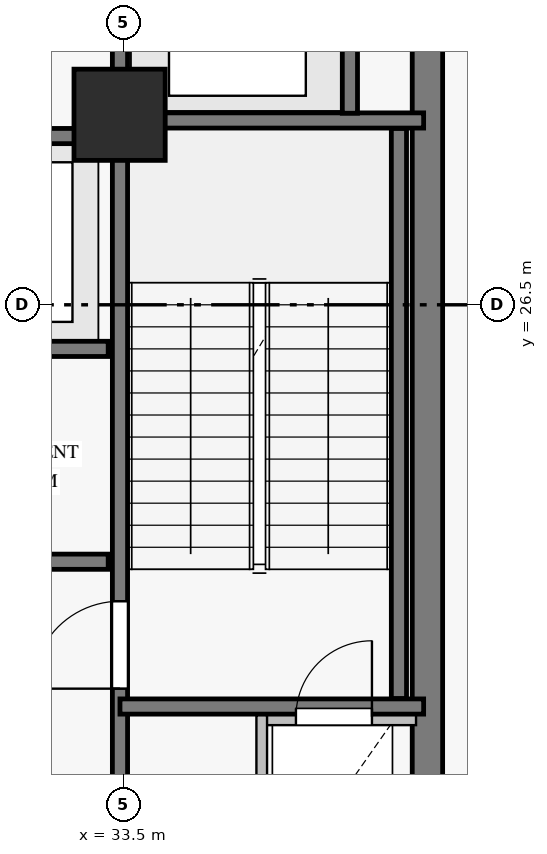
"""IFC4 building model, lengths in metres.
Left out: names, types, materials, properties, quantities, classifications, styles, units other than length and angle.
Written with IfcOpenShell. Run it as: python <this file> out.ifc"""

import sys

from ifc_helpers import new_model, si_unit, direction, frame, frame_2d, origin, origin_with_axes, origin_2d, place, context, subcontext, project, spatial, rectangle, extrude, source, transform, mapped, element, fill, save


model = new_model("IFC4")
c1 = context("Model", 3, precision=1e-05, world=origin(), true_north=direction((0.0, 1.0)))
c2 = subcontext(c1, "Body", "Model", "MODEL_VIEW")
j1 = project(units=[si_unit("LENGTHUNIT", "METRE"), si_unit("PLANEANGLEUNIT", "RADIAN")], contexts=[c1])
p1 = place(None, origin())
s1 = spatial("IfcSite", under=j1, at=p1, CompositionType="ELEMENT")
p2 = place(p1, origin())
s2 = spatial("IfcBuilding", under=s1, at=p2, CompositionType="ELEMENT")
p3 = place(p2, frame((0.0, 0.0, 148.05)))
s3 = spatial("IfcBuildingStorey", under=s2, at=p3, CompositionType="ELEMENT", Elevation=148.05)
p4 = place(p3, frame((37.5, 18.3, 0.0), z_axis=(0.0, 0.0, 1.0), x_axis=(0.0, 1.0, 0.0)))
e1 = element("IfcWall", 1, at=p4, inside=s3, PredefinedType="SHEAR", context=c2, shape_type="SweptSolid", body=[
    extrude(rectangle(XDim=16.4, YDim=0.4, at=frame_2d((8.2, 0.0))), origin(), (0.0, 0.0, 1.0), 4.275),
])
p5 = place(p4, frame((14.15, 0.0, 0.0)))
e2 = element("IfcOpeningElement", 2, at=p5, cuts=e1, PredefinedType="OPENING", context=c2, shape_type="SweptSolid", body=[
    extrude(rectangle(XDim=1.2, YDim=2.15, at=frame_2d((0.6, 1.075))), frame((0.0, 0.21, 0.0), z_axis=(0.0, -1.0, 0.0), x_axis=(1.0, 0.0, 0.0)), (0.0, 0.0, 1.0), 0.42),
])
m1 = source(origin_with_axes(), c2, "Body", "SweptSolid", [
    extrude(rectangle(XDim=1.2, YDim=1.2, at=origin_2d()), origin(), (0.0, 0.0, 1.0), 4.5),
])
p6 = place(p3, frame((33.45, 29.0, 0.0), z_axis=(0.0, 0.0, 1.0), x_axis=(1.0, 0.0, 0.0)))
e3 = element("IfcColumn", 3, at=p6, inside=s3, PredefinedType="COLUMN", context=c2, shape_type="MappedRepresentation", body=[
    mapped(m1, transform((0.0, 0.0, 0.0), scale=1.0)),
])
p7 = place(p3, frame((35.32, 21.08, 0.0), z_axis=(0.0, 0.0, 1.0), x_axis=(1.0, 0.0, 0.0)))
e4 = element("IfcWall", 4, at=p7, inside=s3, PredefinedType="SHEAR", context=c2, shape_type="SweptSolid", body=[
    extrude(rectangle(XDim=2.03, YDim=0.22, at=frame_2d((1.015, 0.0))), origin(), (0.0, 0.0, 1.0), 2.45),
])
p8 = place(p7, frame((0.45, 0.0, 0.0)))
e5 = element("IfcOpeningElement", 5, at=p8, cuts=e4, PredefinedType="OPENING", context=c2, shape_type="SweptSolid", body=[
    extrude(rectangle(XDim=1.0, YDim=2.05, at=frame_2d((0.5, 1.025))), frame((0.0, 0.12, 0.0), z_axis=(0.0, -1.0, 0.0), x_axis=(1.0, 0.0, 0.0)), (0.0, 0.0, 1.0), 0.24),
])
p9 = place(p3, frame((33.455, 18.7, 0.0), z_axis=(0.0, 0.0, 1.0), x_axis=(0.0, 1.0, 0.0)))
e6 = element("IfcWall", 6, at=p9, inside=s3, PredefinedType="SHEAR", context=c2, shape_type="SweptSolid", body=[
    extrude(rectangle(XDim=15.6, YDim=0.2, at=frame_2d((7.8, 0.0))), origin(), (0.0, 0.0, 1.0), 4.275),
])
p10 = place(p9, frame((2.75, 0.0, 0.0)))
e7 = element("IfcOpeningElement", 7, at=p10, cuts=e6, PredefinedType="OPENING", context=c2, shape_type="SweptSolid", body=[
    extrude(rectangle(XDim=1.15, YDim=2.15, at=frame_2d((0.575, 1.075))), frame((0.0, 0.11, 0.0), z_axis=(0.0, -1.0, 0.0), x_axis=(1.0, 0.0, 0.0)), (0.0, 0.0, 1.0), 0.22),
])
p11 = place(p9, frame((0.55, 0.0, 0.0)))
e8 = element("IfcOpeningElement", 8, at=p11, cuts=e6, PredefinedType="OPENING", context=c2, shape_type="SweptSolid", body=[
    extrude(rectangle(XDim=0.94, YDim=2.1, at=frame_2d((0.47, 1.05))), frame((0.0, 0.11, 0.0), z_axis=(0.0, -1.0, 0.0), x_axis=(1.0, 0.0, 0.0)), (0.0, 0.0, 1.0), 0.22),
])
p12 = place(p3, frame((23.7, 23.12, 0.0), z_axis=(0.0, 0.0, 1.0), x_axis=(1.0, 0.0, 0.0)))
e9 = element("IfcWall", 9, at=p12, inside=s3, PredefinedType="SHEAR", context=c2, shape_type="SweptSolid", body=[
    extrude(rectangle(XDim=9.6, YDim=0.2, at=frame_2d((4.8, 0.0))), origin(), (0.0, 0.0, 1.0), 4.275),
])
p13 = place(p12, frame((1.1, 0.0, 0.0)))
e10 = element("IfcOpeningElement", 10, at=p13, cuts=e9, PredefinedType="OPENING", context=c2, shape_type="SweptSolid", body=[
    extrude(rectangle(XDim=0.92, YDim=2.1, at=frame_2d((0.46, 1.05))), frame((0.0, 0.11, 0.0), z_axis=(0.0, -1.0, 0.0), x_axis=(1.0, 0.0, 0.0)), (0.0, 0.0, 1.0), 0.22),
])
p14 = place(p12, frame((5.2, 0.0, 0.0)))
e11 = element("IfcOpeningElement", 11, at=p14, cuts=e9, PredefinedType="OPENING", context=c2, shape_type="SweptSolid", body=[
    extrude(rectangle(XDim=1.0, YDim=2.15, at=frame_2d((0.5, 1.075))), frame((0.0, 0.11, 0.0), z_axis=(0.0, -1.0, 0.0), x_axis=(1.0, 0.0, 0.0)), (0.0, 0.0, 1.0), 0.22),
])
p15 = place(p3, frame((23.7, 25.92, 0.0), z_axis=(0.0, 0.0, 1.0), x_axis=(1.0, 0.0, 0.0)))
e12 = element("IfcWall", 12, at=p15, inside=s3, PredefinedType="SHEAR", context=c2, shape_type="SweptSolid", body=[
    extrude(rectangle(XDim=9.6, YDim=0.2, at=frame_2d((4.8, 0.0))), origin(), (0.0, 0.0, 1.0), 4.275),
])
p16 = place(p3, frame((23.7, 28.72, 0.0), z_axis=(0.0, 0.0, 1.0), x_axis=(1.0, 0.0, 0.0)))
e13 = element("IfcWall", 13, at=p16, inside=s3, PredefinedType="SHEAR", context=c2, shape_type="SweptSolid", body=[
    extrude(rectangle(XDim=9.6, YDim=0.2, at=frame_2d((4.8, 0.0))), origin(), (0.0, 0.0, 1.0), 4.275),
])
p17 = place(p16, frame((0.6, 0.0, 0.0)))
e14 = element("IfcOpeningElement", 14, at=p17, cuts=e13, PredefinedType="OPENING", context=c2, shape_type="SweptSolid", body=[
    extrude(rectangle(XDim=1.1, YDim=2.15, at=frame_2d((0.55, 1.075))), frame((0.0, 0.11, 0.0), z_axis=(0.0, -1.0, 0.0), x_axis=(1.0, 0.0, 0.0)), (0.0, 0.0, 1.0), 0.22),
])
p18 = place(p16, frame((2.98, 0.0, 0.0)))
e15 = element("IfcOpeningElement", 15, at=p18, cuts=e13, PredefinedType="OPENING", context=c2, shape_type="SweptSolid", body=[
    extrude(rectangle(XDim=1.1, YDim=2.15, at=frame_2d((0.55, 1.075))), frame((0.0, 0.11, 0.0), z_axis=(0.0, -1.0, 0.0), x_axis=(1.0, 0.0, 0.0)), (0.0, 0.0, 1.0), 0.22),
])
p19 = place(p16, frame((5.36, 0.0, 0.0)))
e16 = element("IfcOpeningElement", 16, at=p19, cuts=e13, PredefinedType="OPENING", context=c2, shape_type="SweptSolid", body=[
    extrude(rectangle(XDim=1.1, YDim=2.15, at=frame_2d((0.55, 1.075))), frame((0.0, 0.11, 0.0), z_axis=(0.0, -1.0, 0.0), x_axis=(1.0, 0.0, 0.0)), (0.0, 0.0, 1.0), 0.22),
])
p20 = place(p16, frame((7.74, 0.0, 0.0)))
e17 = element("IfcOpeningElement", 17, at=p20, cuts=e13, PredefinedType="OPENING", context=c2, shape_type="SweptSolid", body=[
    extrude(rectangle(XDim=1.1, YDim=2.15, at=frame_2d((0.55, 1.075))), frame((0.0, 0.11, 0.0), z_axis=(0.0, -1.0, 0.0), x_axis=(1.0, 0.0, 0.0)), (0.0, 0.0, 1.0), 0.22),
])
p21 = place(p3, frame((37.125, 21.32, 0.0), z_axis=(0.0, 0.0, 1.0), x_axis=(0.0, 1.0, 0.0)))
e18 = element("IfcWall", 18, at=p21, inside=s3, PredefinedType="SHEAR", context=c2, shape_type="SweptSolid", body=[
    extrude(rectangle(XDim=7.5, YDim=0.2, at=frame_2d((3.75, 0.0))), origin(), (0.0, 0.0, 1.0), 4.275),
])
for number, where, z_axis, x_axis in (
    (19, (33.455, 21.215, 0.0), (0.0, 0.0, 1.0), (1.0, 0.0, 0.0)),
    (20, (33.455, 28.925, 0.0), (0.0, 0.0, 1.0), (1.0, 0.0, 0.0)),
):
    element("IfcWall", number, at=place(p3, frame(where, z_axis=z_axis, x_axis=x_axis)), inside=s3, PredefinedType="SHEAR", context=c2, shape_type="SweptSolid", body=[
        extrude(rectangle(XDim=3.995, YDim=0.2, at=frame_2d((1.998, 0.0))), origin(), (0.0, 0.0, 1.0), 4.275),
    ])
p22 = place(p3, frame((36.48, 29.02, 0.0), z_axis=(0.0, 0.0, 1.0), x_axis=(0.0, 1.0, 0.0)))
e21 = element("IfcWall", 21, at=p22, inside=s3, PredefinedType="SHEAR", context=c2, shape_type="SweptSolid", body=[
    extrude(rectangle(XDim=2.86, YDim=0.2, at=frame_2d((1.43, 0.0))), origin(), (0.0, 0.0, 1.0), 4.275),
])
p23 = place(p3, frame((35.32, 18.507, 0.0), z_axis=(0.0, 0.0, 1.0), x_axis=(0.0, 1.0, 0.0)))
e22 = element("IfcWall", 22, at=p23, inside=s3, PredefinedType="PARTITIONING", context=c2, shape_type="SweptSolid", body=[
    extrude(rectangle(XDim=2.592, YDim=0.14, at=frame_2d((1.296, 0.0))), origin(), (0.0, 0.0, 1.0), 4.275),
])
m2 = source(origin_with_axes(), c2, "Body", "SweptSolid", [
    extrude(rectangle(XDim=1.0, YDim=2.05, at=frame_2d((0.5, 1.025))), frame((0.0, 0.025, 0.0), z_axis=(0.0, -1.0, 0.0), x_axis=(1.0, 0.0, 0.0)), (0.0, 0.0, 1.0), 0.05),
])
p24 = place(p8, origin())
e23 = element("IfcDoor", 23, at=p24, inside=s3, OperationType="SINGLE_SWING_RIGHT", PredefinedType="TRAPDOOR", context=c2, shape_type="MappedRepresentation", body=[
    mapped(m2, transform((0.0, 0.0, 0.0), scale=1.0)),
])
fill(e5, e23)
m3 = source(origin_with_axes(), c2, "Body", "SweptSolid", [
    extrude(rectangle(XDim=1.15, YDim=2.15, at=frame_2d((0.575, 1.075))), frame((0.0, 0.025, 0.0), z_axis=(0.0, -1.0, 0.0), x_axis=(1.0, 0.0, 0.0)), (0.0, 0.0, 1.0), 0.05),
])
p25 = place(p10, origin())
e24 = element("IfcDoor", 24, at=p25, inside=s3, OperationType="SINGLE_SWING_LEFT", PredefinedType="DOOR", context=c2, shape_type="MappedRepresentation", body=[
    mapped(m3, transform((0.0, 0.0, 0.0), scale=1.0)),
])
fill(e7, e24)
save(model, sys.argv[1])
